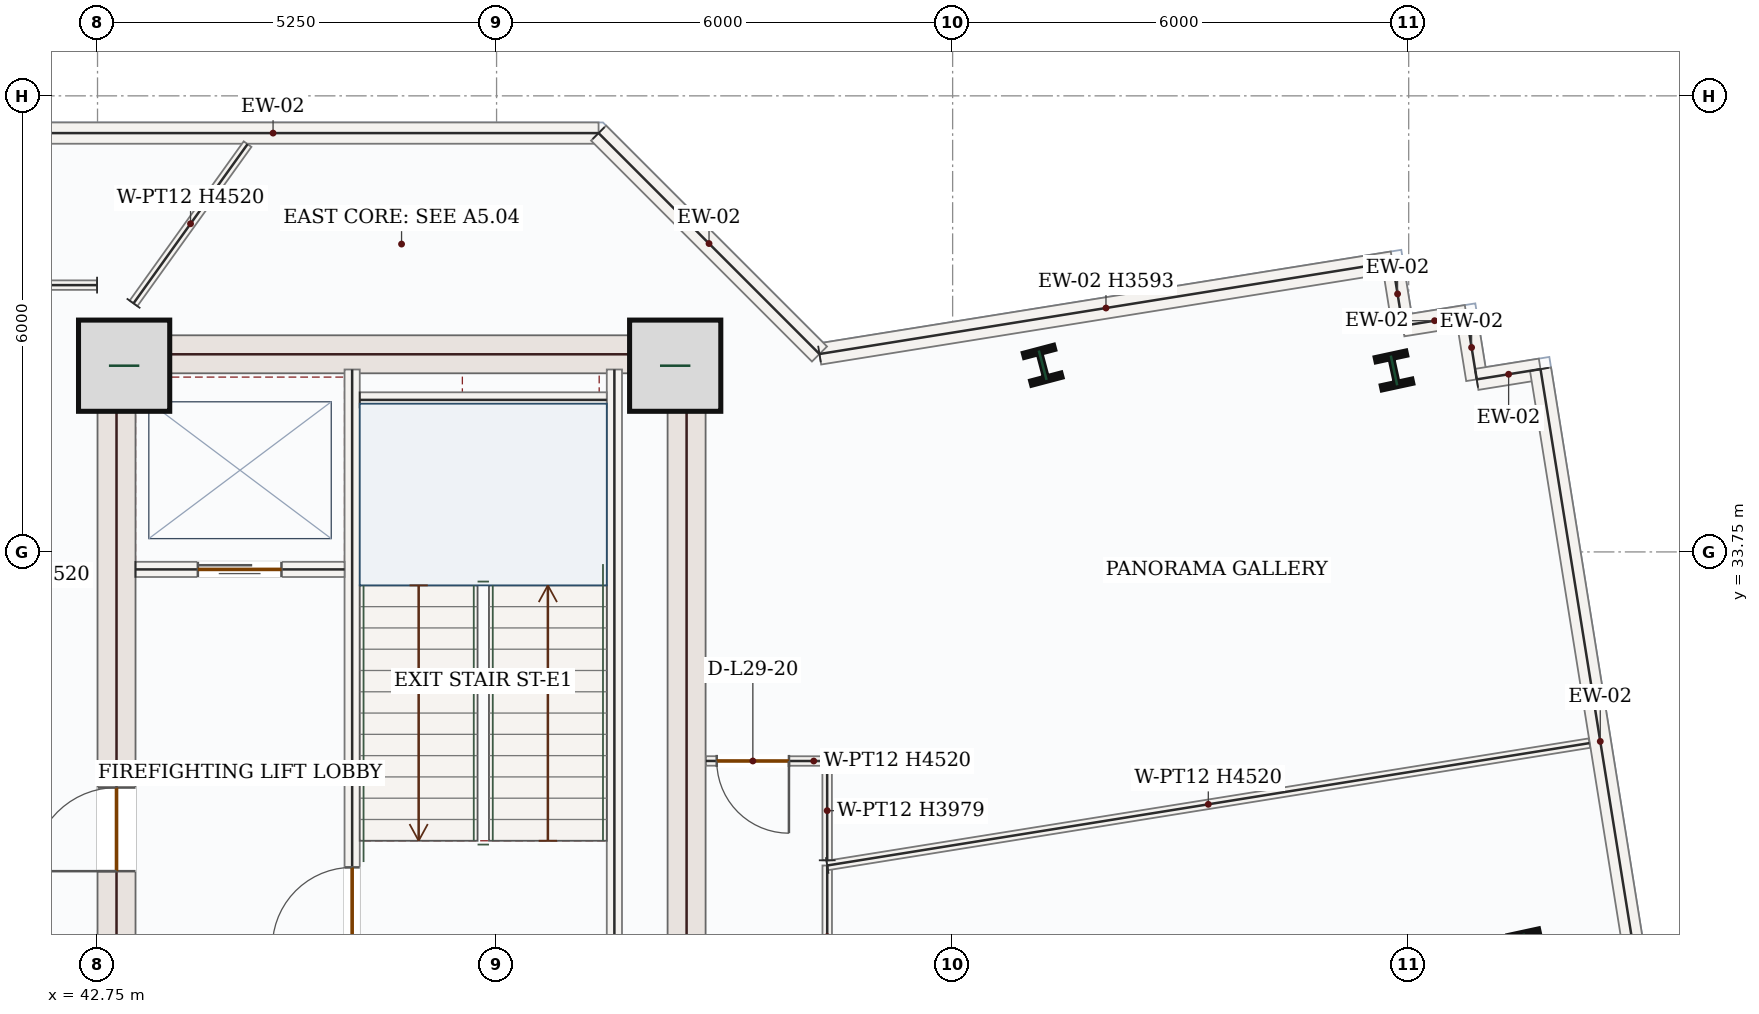
"""IFC4 building model, lengths in metres.
Left out: names, types, materials, properties, quantities, classifications, styles, units other than length and angle.
Written with IfcOpenShell. Run it as: python <this file> out.ifc"""

import sys

from ifc_helpers import new_model, si_unit, direction, frame, frame_2d, origin, origin_2d, place, context, subcontext, project, spatial, rectangle, i_section, extrude, source, transform, mapped, element, fill, save


model = new_model("IFC4")
c1 = context("Model", 3, precision=1e-05, world=origin(), true_north=direction((0.0, 1.0)))
c2 = subcontext(c1, "Body", "Model", "MODEL_VIEW")
j1 = project(units=[si_unit("LENGTHUNIT", "METRE"), si_unit("PLANEANGLEUNIT", "RADIAN")], contexts=[c1])
p1 = place(None, origin())
s1 = spatial("IfcSite", under=j1, at=p1, CompositionType="ELEMENT")
p2 = place(p1, origin())
s2 = spatial("IfcBuilding", under=s1, at=p2, CompositionType="ELEMENT")
p3 = place(p2, frame((0.0, 0.0, 130.8)))
s3 = spatial("IfcBuildingStorey", under=s2, at=p3, CompositionType="ELEMENT", Elevation=130.8)
p4 = place(p3, frame((43.0, 28.05, 0.0), z_axis=(0.0, 0.0, 1.0), x_axis=(0.0, 1.0, 0.0)))
e1 = element("IfcWall", 1, at=p4, inside=s3, PredefinedType="SHEAR", context=c2, shape_type="SweptSolid", body=[
    extrude(rectangle(XDim=8.55, YDim=0.5, at=frame_2d((4.275, 0.0))), origin(), (0.0, 0.0, 1.0), 4.52),
])
p5 = place(p4, frame((1.5, 0.0, 0.0)))
e2 = element("IfcOpeningElement", 2, at=p5, cuts=e1, PredefinedType="OPENING", context=c2, shape_type="SweptSolid", body=[
    extrude(rectangle(XDim=1.1, YDim=2.2, at=frame_2d((0.55, 1.1))), frame((0.0, 0.26, 0.0), z_axis=(0.0, -1.0, 0.0), x_axis=(1.0, 0.0, 0.0)), (0.0, 0.0, 1.0), 0.52),
])
m1 = source(origin(), c2, "Body", "SweptSolid", [
    extrude(rectangle(XDim=8.55, YDim=0.5, at=frame_2d((4.275, 0.0))), origin(), (0.0, 0.0, 1.0), 4.52),
])
p6 = place(p3, frame((50.5, 28.05, 0.0), z_axis=(0.0, 0.0, 1.0), x_axis=(0.0, 1.0, 0.0)))
e3 = element("IfcWall", 3, at=p6, inside=s3, PredefinedType="SHEAR", context=c2, shape_type="MappedRepresentation", body=[
    mapped(m1, transform((0.0, 0.0, 0.0), x_axis=(1.0, 0.0, 0.0), y_axis=(0.0, 1.0, 0.0), z_axis=(0.0, 0.0, 1.0), scale=1.0)),
])
m2 = source(origin(), c2, "Body", "SweptSolid", [
    extrude(rectangle(XDim=7.0, YDim=0.5, at=frame_2d((3.5, 0.0))), origin(), (0.0, 0.0, 1.0), 4.52),
])
p7 = place(p3, frame((43.25, 36.35, 0.0), z_axis=(0.0, 0.0, 1.0), x_axis=(1.0, 0.0, 0.0)))
e4 = element("IfcWall", 4, at=p7, inside=s3, PredefinedType="SHEAR", context=c2, shape_type="MappedRepresentation", body=[
    mapped(m2, transform((0.0, 0.0, 0.0), x_axis=(1.0, 0.0, 0.0), y_axis=(0.0, 1.0, 0.0), z_axis=(0.0, 0.0, 1.0), scale=1.0)),
])
m3 = source(origin(), c2, "Body", "SweptSolid", [
    extrude(rectangle(XDim=1.2, YDim=1.2, at=origin_2d()), origin(), (0.0, 0.0, 1.0), 4.8),
])
for number, where, z_axis, x_axis in (
    (5, (43.1, 36.2, 0.0), (0.0, 0.0, 1.0), (1.0, 0.0, 0.0)),
    (6, (50.35, 36.2, 0.0), (0.0, 0.0, 1.0), (1.0, 0.0, 0.0)),
):
    element("IfcColumn", number, at=place(p3, frame(where, z_axis=z_axis, x_axis=x_axis)), inside=s3, PredefinedType="COLUMN", context=c2, shape_type="MappedRepresentation", body=[
        mapped(m3, transform((0.0, 0.0, 0.0), x_axis=(1.0, 0.0, 0.0), y_axis=(0.0, 1.0, 0.0), z_axis=(0.0, 0.0, 1.0), scale=1.0)),
    ])
m4 = source(origin(), c2, "Body", "SweptSolid", [
    extrude(i_section(OverallWidth=0.412, OverallDepth=0.435, WebThickness=0.036, FlangeThickness=0.057, FilletRadius=0.018, at=origin_2d()), origin(), (0.0, 0.0, 1.0), 4.8),
])
for number, where, z_axis, x_axis in (
    (7, (55.185, 36.206, 0.0), (0.0, 0.0, 1.0), (0.967, 0.255, 0.0)),
    (8, (61.553, 28.535, 0.0), (0.0, 0.0, 1.0), (0.977, 0.211, 0.0)),
    (9, (59.807, 36.137, 0.0), (0.0, 0.0, 1.0), (0.977, 0.211, 0.0)),
):
    element("IfcColumn", number, at=place(p3, frame(where, z_axis=z_axis, x_axis=x_axis)), inside=s3, PredefinedType="COLUMN", context=c2, shape_type="MappedRepresentation", body=[
        mapped(m4, transform((0.0, 0.0, 0.0), x_axis=(1.0, 0.0, 0.0), y_axis=(0.0, 1.0, 0.0), z_axis=(0.0, 0.0, 1.0), scale=1.0)),
    ])
m5 = source(origin(), c2, "Body", "SweptSolid", [
    extrude(rectangle(XDim=7.635, YDim=0.28, at=frame_2d((3.817, 0.0))), origin(), (0.0, 0.0, 1.0), 3.593),
])
p8 = place(p3, frame((52.248, 36.354, 0.0), z_axis=(0.0, 0.0, 1.0), x_axis=(0.987361485622, 0.158484373712, 0.0)))
e10 = element("IfcWall", 10, at=p8, inside=s3, PredefinedType="SOLIDWALL", context=c2, shape_type="MappedRepresentation", body=[
    mapped(m5, transform((0.0, 0.0, 0.0), x_axis=(1.0, 0.0, 0.0), y_axis=(0.0, 1.0, 0.0), z_axis=(0.0, 0.0, 1.0), scale=1.0)),
])
m6 = source(origin(), c2, "Body", "SweptSolid", [
    extrude(rectangle(XDim=0.85, YDim=0.28, at=frame_2d((0.425, 0.0))), origin(), (0.0, 0.0, 1.0), 4.52),
])
for number, where, z_axis, x_axis in (
    (11, (59.786, 37.564, 0.0), (0.0, 0.0, 1.0), (0.159, -0.987, 0.0)),
    (12, (59.921, 36.725, 0.0), (0.0, 0.0, 1.0), (0.987, 0.158, 0.0)),
    (13, (60.76, 36.859, 0.0), (0.0, 0.0, 1.0), (0.159, -0.987, 0.0)),
):
    element("IfcWall", number, at=place(p3, frame(where, z_axis=z_axis, x_axis=x_axis)), inside=s3, PredefinedType="SOLIDWALL", context=c2, shape_type="MappedRepresentation", body=[
        mapped(m6, transform((0.0, 0.0, 0.0), x_axis=(1.0, 0.0, 0.0), y_axis=(0.0, 1.0, 0.0), z_axis=(0.0, 0.0, 1.0), scale=1.0)),
    ])
m7 = source(origin(), c2, "Body", "SweptSolid", [
    extrude(rectangle(XDim=0.85, YDim=0.28, at=frame_2d((0.425, 0.0))), origin(), (0.0, 0.0, 1.0), 4.52),
])
p9 = place(p3, frame((60.895, 36.02, 0.0), z_axis=(0.0, 0.0, 1.0), x_axis=(0.987354463376, 0.158528116284, 0.0)))
e14 = element("IfcWall", 14, at=p9, inside=s3, PredefinedType="SOLIDWALL", context=c2, shape_type="MappedRepresentation", body=[
    mapped(m7, transform((0.0, 0.0, 0.0), x_axis=(1.0, 0.0, 0.0), y_axis=(0.0, 1.0, 0.0), z_axis=(0.0, 0.0, 1.0), scale=1.0)),
])
m8 = source(origin(), c2, "Body", "SweptSolid", [
    extrude(rectangle(XDim=9.92, YDim=0.28, at=frame_2d((4.96, 0.0))), origin(), (0.0, 0.0, 1.0), 4.52),
])
p10 = place(p3, frame((61.734, 36.155, 0.0), z_axis=(0.0, 0.0, 1.0), x_axis=(0.158493446705, -0.987360029246, 0.0)))
e15 = element("IfcWall", 15, at=p10, inside=s3, PredefinedType="SOLIDWALL", context=c2, shape_type="MappedRepresentation", body=[
    mapped(m8, transform((0.0, 0.0, 0.0), x_axis=(1.0, 0.0, 0.0), y_axis=(0.0, 1.0, 0.0), z_axis=(0.0, 0.0, 1.0), scale=1.0)),
])
m9 = source(origin(), c2, "Body", "SweptSolid", [
    extrude(rectangle(XDim=8.565, YDim=0.28, at=frame_2d((4.282, 0.0))), origin(), (0.0, 0.0, 1.0), 4.52),
])
p11 = place(p3, frame((40.777, 39.26, 0.0), z_axis=(0.0, 0.0, 1.0), x_axis=(1.0, 0.0, 0.0)))
e16 = element("IfcWall", 16, at=p11, inside=s3, PredefinedType="SOLIDWALL", context=c2, shape_type="MappedRepresentation", body=[
    mapped(m9, transform((0.0, 0.0, 0.0), x_axis=(1.0, 0.0, 0.0), y_axis=(0.0, 1.0, 0.0), z_axis=(0.0, 0.0, 1.0), scale=1.0)),
])
m10 = source(origin(), c2, "Body", "SweptSolid", [
    extrude(rectangle(XDim=4.11, YDim=0.28, at=frame_2d((2.055, 0.0))), origin(), (0.0, 0.0, 1.0), 4.52),
])
p12 = place(p3, frame((49.342, 39.26, 0.0), z_axis=(0.0, 0.0, 1.0), x_axis=(0.707106781187, -0.707106781187, 0.0)))
e17 = element("IfcWall", 17, at=p12, inside=s3, PredefinedType="SOLIDWALL", context=c2, shape_type="MappedRepresentation", body=[
    mapped(m10, transform((0.0, 0.0, 0.0), x_axis=(1.0, 0.0, 0.0), y_axis=(0.0, 1.0, 0.0), z_axis=(0.0, 0.0, 1.0), scale=1.0)),
])
m11 = source(origin(), c2, "Body", "SweptSolid", [
    extrude(rectangle(XDim=7.87, YDim=0.2, at=frame_2d((3.935, 0.0))), origin(), (0.0, 0.0, 1.0), 4.52),
])
p13 = place(p3, frame((49.55, 28.28, 0.0), z_axis=(0.0, 0.0, 1.0), x_axis=(0.0, 1.0, 0.0)))
e18 = element("IfcWall", 18, at=p13, inside=s3, PredefinedType="SOLIDWALL", context=c2, shape_type="MappedRepresentation", body=[
    mapped(m11, transform((0.0, 0.0, 0.0), x_axis=(1.0, 0.0, 0.0), y_axis=(0.0, 1.0, 0.0), z_axis=(0.0, 0.0, 1.0), scale=1.0)),
])
p14 = place(p3, frame((46.1, 28.15, 0.0), z_axis=(0.0, 0.0, 1.0), x_axis=(0.0, 1.0, 0.0)))
e19 = element("IfcWall", 19, at=p14, inside=s3, PredefinedType="SOLIDWALL", context=c2, shape_type="SweptSolid", body=[
    extrude(rectangle(XDim=8.0, YDim=0.2, at=frame_2d((4.0, 0.0))), origin(), (0.0, 0.0, 1.0), 4.52),
])
p15 = place(p14, frame((0.4, 0.0, 0.0)))
e20 = element("IfcOpeningElement", 20, at=p15, cuts=e19, PredefinedType="OPENING", context=c2, shape_type="SweptSolid", body=[
    extrude(rectangle(XDim=1.05, YDim=2.15, at=frame_2d((0.525, 1.075))), frame((0.0, 0.11, 0.0), z_axis=(0.0, -1.0, 0.0), x_axis=(1.0, 0.0, 0.0)), (0.0, 0.0, 1.0), 0.22),
])
m12 = source(origin(), c2, "Body", "SweptSolid", [
    extrude(rectangle(XDim=3.25, YDim=0.2, at=frame_2d((1.625, 0.0))), origin(), (0.0, 0.0, 1.0), 4.52),
])
p16 = place(p3, frame((46.2, 35.75, 0.0), z_axis=(0.0, 0.0, 1.0), x_axis=(1.0, 0.0, 0.0)))
e21 = element("IfcWall", 21, at=p16, inside=s3, PredefinedType="SOLIDWALL", context=c2, shape_type="MappedRepresentation", body=[
    mapped(m12, transform((0.0, 0.0, 0.0), x_axis=(1.0, 0.0, 0.0), y_axis=(0.0, 1.0, 0.0), z_axis=(0.0, 0.0, 1.0), scale=1.0)),
])
p17 = place(p3, frame((43.25, 33.52, 0.0), z_axis=(0.0, 0.0, 1.0), x_axis=(1.0, 0.0, 0.0)))
e22 = element("IfcWall", 22, at=p17, inside=s3, PredefinedType="SOLIDWALL", context=c2, shape_type="SweptSolid", body=[
    extrude(rectangle(XDim=2.75, YDim=0.2, at=frame_2d((1.375, 0.0))), origin(), (0.0, 0.0, 1.0), 4.52),
])
p18 = place(p17, frame((0.82, 0.0, 0.0)))
e23 = element("IfcOpeningElement", 23, at=p18, cuts=e22, PredefinedType="OPENING", context=c2, shape_type="SweptSolid", body=[
    extrude(rectangle(XDim=1.1, YDim=2.15, at=frame_2d((0.55, 1.075))), frame((0.0, 0.11, 0.0), z_axis=(0.0, -1.0, 0.0), x_axis=(1.0, 0.0, 0.0)), (0.0, 0.0, 1.0), 0.22),
])
m13 = source(origin(), c2, "Body", "SweptSolid", [
    extrude(rectangle(XDim=1.874, YDim=0.125, at=frame_2d((0.937, 0.0))), origin(), (0.0, 0.0, 1.0), 3.593),
])
p19 = place(p3, frame((52.35, 27.751, 0.0), z_axis=(0.0, 0.0, 1.0), x_axis=(0.0, 1.0, 0.0)))
e24 = element("IfcWall", 24, at=p19, inside=s3, PredefinedType="PARTITIONING", context=c2, shape_type="MappedRepresentation", body=[
    mapped(m13, transform((0.0, 0.0, 0.0), x_axis=(1.0, 0.0, 0.0), y_axis=(0.0, 1.0, 0.0), z_axis=(0.0, 0.0, 1.0), scale=1.0)),
])
m14 = source(origin(), c2, "Body", "SweptSolid", [
    extrude(rectangle(XDim=10.156, YDim=0.125, at=frame_2d((5.078, 0.0))), origin(), (0.0, 0.0, 1.0), 4.52),
])
p20 = place(p3, frame((52.35, 29.625, 0.0), z_axis=(0.0, 0.0, 1.0), x_axis=(0.987359342163, 0.158497726933, 0.0)))
e25 = element("IfcWall", 25, at=p20, inside=s3, PredefinedType="PARTITIONING", context=c2, shape_type="MappedRepresentation", body=[
    mapped(m14, transform((0.0, 0.0, 0.0), x_axis=(1.0, 0.0, 0.0), y_axis=(0.0, 1.0, 0.0), z_axis=(0.0, 0.0, 1.0), scale=1.0)),
])
p21 = place(p3, frame((52.349, 30.999, 0.0), z_axis=(0.0, 0.0, 1.0), x_axis=(-0.999999812387, 0.000612557312, 0.0)))
e26 = element("IfcWall", 26, at=p21, inside=s3, PredefinedType="PARTITIONING", context=c2, shape_type="SweptSolid", body=[
    extrude(rectangle(XDim=1.594, YDim=0.125, at=frame_2d((0.797, 0.0))), origin(), (0.0, 0.0, 1.0), 4.52),
])
p22 = place(p21, frame((0.502, 0.0, 0.0)))
e27 = element("IfcOpeningElement", 27, at=p22, cuts=e26, PredefinedType="OPENING", context=c2, shape_type="SweptSolid", body=[
    extrude(rectangle(XDim=0.95, YDim=2.15, at=frame_2d((0.475, 1.075))), frame((0.0, 0.073, 0.0), z_axis=(0.0, -1.0, 0.0), x_axis=(1.0, 0.0, 0.0)), (0.0, 0.0, 1.0), 0.145),
])
m15 = source(origin(), c2, "Body", "SweptSolid", [
    extrude(rectangle(XDim=2.577, YDim=0.125, at=frame_2d((1.289, 0.0))), origin(), (0.0, 0.0, 1.0), 4.52),
])
p23 = place(p3, frame((43.224, 37.02, 0.0), z_axis=(0.0, 0.0, 1.0), x_axis=(0.582286278149, 0.812983819199, 0.0)))
e28 = element("IfcWall", 28, at=p23, inside=s3, PredefinedType="PARTITIONING", context=c2, shape_type="MappedRepresentation", body=[
    mapped(m15, transform((0.0, 0.0, 0.0), x_axis=(1.0, 0.0, 0.0), y_axis=(0.0, 1.0, 0.0), z_axis=(0.0, 0.0, 1.0), scale=1.0)),
])
m16 = source(origin(), c2, "Body", "SweptSolid", [
    extrude(rectangle(XDim=1.306, YDim=0.125, at=frame_2d((0.653, 0.0))), origin(), (0.0, 0.0, 1.0), 3.979),
])
p24 = place(p3, frame((52.35, 29.693, 0.0), z_axis=(0.0, 0.0, 1.0), x_axis=(-0.000747803119, 0.999999720395, 0.0)))
e29 = element("IfcWall", 29, at=p24, inside=s3, PredefinedType="PARTITIONING", context=c2, shape_type="MappedRepresentation", body=[
    mapped(m16, transform((0.0, 0.0, 0.0), x_axis=(1.0, 0.0, 0.0), y_axis=(0.0, 1.0, 0.0), z_axis=(0.0, 0.0, 1.0), scale=1.0)),
])
p25 = place(p3, frame((42.744, 37.26, 0.0), z_axis=(0.0, 0.0, 1.0), x_axis=(-0.999999999345, -3.6194509e-05, 0.0)))
e30 = element("IfcWall", 30, at=p25, inside=s3, PredefinedType="PARTITIONING", context=c2, shape_type="SweptSolid", body=[
    extrude(rectangle(XDim=13.49, YDim=0.125, at=frame_2d((6.745, 0.0))), origin(), (0.0, 0.0, 1.0), 3.979),
])
p26 = place(p25, frame((6.27, 0.0, 0.0)))
e31 = element("IfcOpeningElement", 31, at=p26, cuts=e30, PredefinedType="OPENING", context=c2, shape_type="SweptSolid", body=[
    extrude(rectangle(XDim=0.95, YDim=2.15, at=frame_2d((0.475, 1.075))), frame((0.0, 0.073, 0.0), z_axis=(0.0, -1.0, 0.0), x_axis=(1.0, 0.0, 0.0)), (0.0, 0.0, 1.0), 0.145),
])
m17 = source(origin(), c2, "Body", "SweptSolid", [
    extrude(rectangle(XDim=1.05, YDim=2.15, at=frame_2d((0.525, 1.075))), frame((0.0, 0.025, 0.0), z_axis=(0.0, -1.0, 0.0), x_axis=(1.0, 0.0, 0.0)), (0.0, 0.0, 1.0), 0.05),
])
p27 = place(p15, origin())
e32 = element("IfcDoor", 32, at=p27, inside=s3, OperationType="SINGLE_SWING_LEFT", PredefinedType="DOOR", context=c2, shape_type="MappedRepresentation", body=[
    mapped(m17, transform((0.0, 0.0, 0.0), x_axis=(1.0, 0.0, 0.0), y_axis=(0.0, 1.0, 0.0), z_axis=(0.0, 0.0, 1.0), scale=1.0)),
])
fill(e20, e32)
m18 = source(origin(), c2, "Body", "SweptSolid", [
    extrude(rectangle(XDim=1.1, YDim=2.15, at=frame_2d((0.55, 1.075))), frame((0.0, 0.025, 0.0), z_axis=(0.0, -1.0, 0.0), x_axis=(1.0, 0.0, 0.0)), (0.0, 0.0, 1.0), 0.05),
])
p28 = place(p18, origin())
e33 = element("IfcDoor", 33, at=p28, inside=s3, OperationType="DOUBLE_DOOR_SLIDING", PredefinedType="DOOR", context=c2, shape_type="MappedRepresentation", body=[
    mapped(m18, transform((0.0, 0.0, 0.0), x_axis=(1.0, 0.0, 0.0), y_axis=(0.0, 1.0, 0.0), z_axis=(0.0, 0.0, 1.0), scale=1.0)),
])
fill(e23, e33)
m19 = source(origin(), c2, "Body", "SweptSolid", [
    extrude(rectangle(XDim=1.1, YDim=2.2, at=frame_2d((0.55, 1.1))), frame((0.0, 0.025, 0.0), z_axis=(0.0, -1.0, 0.0), x_axis=(1.0, 0.0, 0.0)), (0.0, 0.0, 1.0), 0.05),
])
p29 = place(p5, origin())
e34 = element("IfcDoor", 34, at=p29, inside=s3, OperationType="SINGLE_SWING_LEFT", PredefinedType="DOOR", context=c2, shape_type="MappedRepresentation", body=[
    mapped(m19, transform((0.0, 0.0, 0.0), x_axis=(1.0, 0.0, 0.0), y_axis=(0.0, 1.0, 0.0), z_axis=(0.0, 0.0, 1.0), scale=1.0)),
])
fill(e2, e34)
m20 = source(origin(), c2, "Body", "SweptSolid", [
    extrude(rectangle(XDim=0.95, YDim=2.15, at=frame_2d((0.475, 1.075))), frame((0.0, 0.025, 0.0), z_axis=(0.0, -1.0, 0.0), x_axis=(1.0, 0.0, 0.0)), (0.0, 0.0, 1.0), 0.05),
])
p30 = place(p22, origin())
e35 = element("IfcDoor", 35, at=p30, inside=s3, OperationType="SINGLE_SWING_LEFT", PredefinedType="DOOR", context=c2, shape_type="MappedRepresentation", body=[
    mapped(m20, transform((0.0, 0.0, 0.0), x_axis=(1.0, 0.0, 0.0), y_axis=(0.0, 1.0, 0.0), z_axis=(0.0, 0.0, 1.0), scale=1.0)),
])
fill(e27, e35)
save(model, sys.argv[1])
